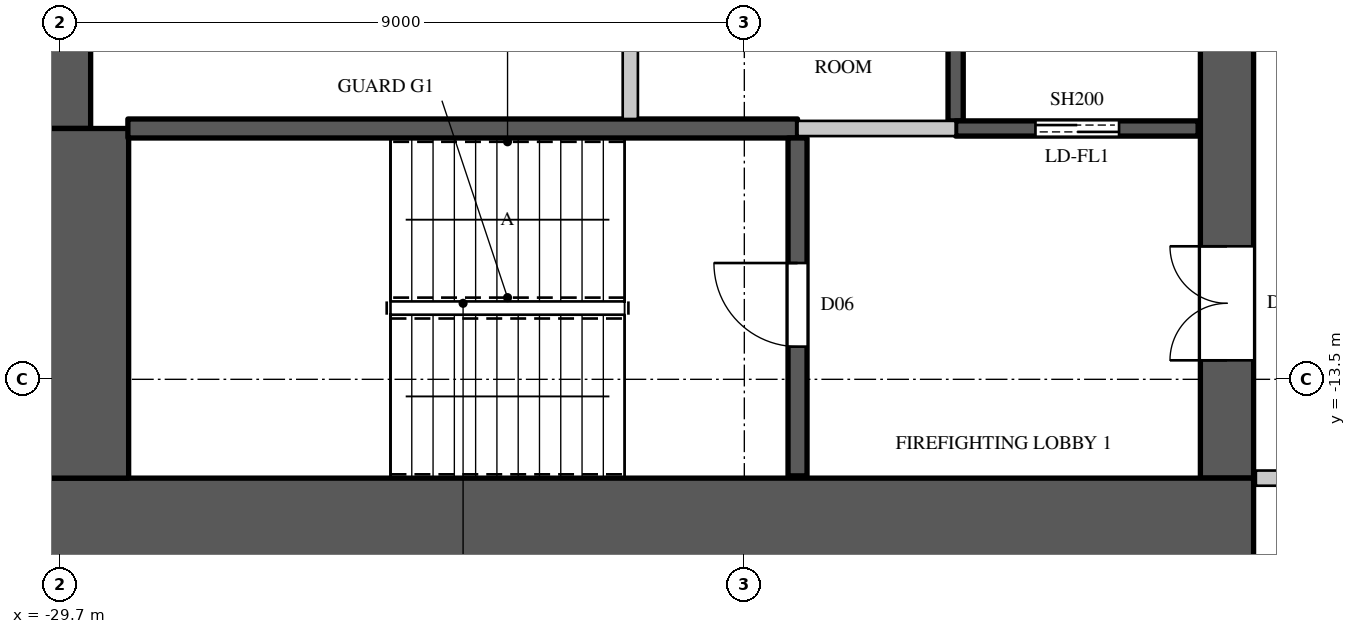
"""IFC4 building model, lengths in metres.
Left out: names, types, materials, properties, quantities, classifications, styles, units other than length and angle.
Written with IfcOpenShell. Run it as: python <this file> out.ifc"""

import sys

from ifc_helpers import new_model, si_unit, direction, frame, frame_2d, origin, place, context, subcontext, project, spatial, rectangle, extrude, element, fill, save


model = new_model("IFC4")
c1 = context("Model", 3, precision=1e-05, world=origin(), true_north=direction((0.0, 1.0)))
c2 = subcontext(c1, "Body", "Model", "MODEL_VIEW")
j1 = project(units=[si_unit("LENGTHUNIT", "METRE"), si_unit("PLANEANGLEUNIT", "RADIAN")], contexts=[c1])
p1 = place(None, origin())
s1 = spatial("IfcSite", under=j1, at=p1, CompositionType="ELEMENT")
p2 = place(p1, origin())
s2 = spatial("IfcBuilding", under=s1, at=p2, CompositionType="ELEMENT")
p3 = place(p2, frame((0.0, 0.0, 321.3)))
s3 = spatial("IfcBuildingStorey", under=s2, at=p3, CompositionType="ELEMENT", Elevation=321.3)
p4 = place(p3, frame((-30.0, -15.4, 0.0), z_axis=(0.0, 0.0, 1.0), x_axis=(1.0, 0.0, 0.0)))
e1 = element("IfcWall", 1, at=p4, inside=s3, PredefinedType="SHEAR", context=c2, shape_type="SweptSolid", body=[
    extrude(rectangle(XDim=16.0, YDim=1.2, at=frame_2d((8.0, 0.0))), origin(), (0.0, 0.0, 1.0), 4.1),
])
p5 = place(p3, frame((-14.35, -14.8, 0.0), z_axis=(0.0, 0.0, 1.0), x_axis=(0.0, 1.0, 0.0)))
e2 = element("IfcWall", 2, at=p5, inside=s3, PredefinedType="SHEAR", context=c2, shape_type="SweptSolid", body=[
    extrude(rectangle(XDim=29.6, YDim=0.7, at=frame_2d((14.8, 0.0))), origin(), (0.0, 0.0, 1.0), 4.1),
])
p6 = place(p5, frame((1.55, 0.0, 0.0)))
e3 = element("IfcOpeningElement", 3, at=p6, cuts=e2, PredefinedType="OPENING", context=c2, shape_type="SweptSolid", body=[
    extrude(rectangle(XDim=1.5, YDim=2.4, at=frame_2d((0.75, 1.2))), frame((0.0, 0.36, 0.0), z_axis=(0.0, -1.0, 0.0), x_axis=(1.0, 0.0, 0.0)), (0.0, 0.0, 1.0), 0.72),
])
p7 = place(p5, frame((26.55, 0.0, 0.0)))
e4 = element("IfcOpeningElement", 4, at=p7, cuts=e2, PredefinedType="OPENING", context=c2, shape_type="SweptSolid", body=[
    extrude(rectangle(XDim=1.5, YDim=2.4, at=frame_2d((0.75, 1.2))), frame((0.0, 0.36, 0.0), z_axis=(0.0, -1.0, 0.0), x_axis=(1.0, 0.0, 0.0)), (0.0, 0.0, 1.0), 0.72),
])
p8 = place(p5, frame((8.45, 0.0, 0.0)))
e5 = element("IfcOpeningElement", 5, at=p8, cuts=e2, PredefinedType="OPENING", context=c2, shape_type="SweptSolid", body=[
    extrude(rectangle(XDim=1.5, YDim=2.4, at=frame_2d((0.75, 1.2))), frame((0.0, 0.36, 0.0), z_axis=(0.0, -1.0, 0.0), x_axis=(1.0, 0.0, 0.0)), (0.0, 0.0, 1.0), 0.72),
])
p9 = place(p5, frame((19.65, 0.0, 0.0)))
e6 = element("IfcOpeningElement", 6, at=p9, cuts=e2, PredefinedType="OPENING", context=c2, shape_type="SweptSolid", body=[
    extrude(rectangle(XDim=1.5, YDim=2.4, at=frame_2d((0.75, 1.2))), frame((0.0, 0.36, 0.0), z_axis=(0.0, -1.0, 0.0), x_axis=(1.0, 0.0, 0.0)), (0.0, 0.0, 1.0), 0.72),
])
p10 = place(p5, frame((14.5, 0.0, 0.0)))
e7 = element("IfcOpeningElement", 7, at=p10, cuts=e2, PredefinedType="OPENING", context=c2, shape_type="SweptSolid", body=[
    extrude(rectangle(XDim=0.6, YDim=2.0, at=frame_2d((0.3, 1.0))), frame((0.0, 0.36, 0.0), z_axis=(0.0, -1.0, 0.0), x_axis=(1.0, 0.0, 0.0)), (0.0, 0.0, 1.0), 0.72),
])
p11 = place(p3, frame((-29.65, -10.2, 0.0), z_axis=(0.0, 0.0, 1.0), x_axis=(0.0, 1.0, 0.0)))
e8 = element("IfcWall", 8, at=p11, inside=s3, PredefinedType="SHEAR", context=c2, shape_type="SweptSolid", body=[
    extrude(rectangle(XDim=20.4, YDim=0.7, at=frame_2d((10.2, 0.0))), origin(), (0.0, 0.0, 1.0), 4.1),
])
p12 = place(p3, frame((-29.4, -14.8, 0.0), z_axis=(0.0, 0.0, 1.0), x_axis=(0.0, 1.0, 0.0)))
e9 = element("IfcWall", 9, at=p12, inside=s3, PredefinedType="SHEAR", context=c2, shape_type="SweptSolid", body=[
    extrude(rectangle(XDim=4.6, YDim=1.2, at=frame_2d((2.3, 0.0))), origin(), (0.0, 0.0, 1.0), 4.1),
])
p13 = place(p3, frame((-13.97, -14.8, 0.0), z_axis=(0.0, 0.0, 1.0), x_axis=(1.0, 0.0, 0.0)))
e10 = element("IfcWall", 10, at=p13, inside=s3, PredefinedType="PARTITIONING", context=c2, shape_type="SweptSolid", body=[
    extrude(rectangle(XDim=2.87, YDim=0.2, at=frame_2d((1.435, 0.0))), origin(), (0.0, 0.0, 1.0), 3.8),
])
p14 = place(p3, frame((-22.2, -10.075, 0.0), z_axis=(0.0, 0.0, 1.0), x_axis=(0.0, 1.0, 0.0)))
e11 = element("IfcWall", 11, at=p14, inside=s3, PredefinedType="PARTITIONING", context=c2, shape_type="SweptSolid", body=[
    extrude(rectangle(XDim=2.575, YDim=0.2, at=frame_2d((1.288, 0.0))), origin(), (0.0, 0.0, 1.0), 3.8),
])
p15 = place(p3, frame((-20.0, -10.2, 0.0), z_axis=(0.0, 0.0, 1.0), x_axis=(1.0, 0.0, 0.0)))
e12 = element("IfcWall", 12, at=p15, inside=s3, PredefinedType="PARTITIONING", context=c2, shape_type="SweptSolid", body=[
    extrude(rectangle(XDim=2.08, YDim=0.2, at=frame_2d((1.04, 0.0))), origin(), (0.0, 0.0, 1.0), 3.8),
])
p16 = place(p3, frame((-17.92, -10.1, 0.0), z_axis=(0.0, 0.0, 1.0), x_axis=(0.0, 1.0, 0.0)))
e13 = element("IfcWall", 13, at=p16, inside=s3, PredefinedType="SHEAR", context=c2, shape_type="SweptSolid", body=[
    extrude(rectangle(XDim=2.6, YDim=0.2, at=frame_2d((1.3, 0.0))), origin(), (0.0, 0.0, 1.0), 3.8),
])
p17 = place(p3, frame((-17.92, -10.2, 0.0), z_axis=(0.0, 0.0, 1.0), x_axis=(1.0, 0.0, 0.0)))
e14 = element("IfcWall", 14, at=p17, inside=s3, PredefinedType="SHEAR", context=c2, shape_type="SweptSolid", body=[
    extrude(rectangle(XDim=3.19, YDim=0.2, at=frame_2d((1.595, 0.0))), origin(), (0.0, 0.0, 1.0), 3.8),
])
p18 = place(p17, frame((1.05, 0.0, 0.0)))
e15 = element("IfcOpeningElement", 15, at=p18, cuts=e14, PredefinedType="OPENING", context=c2, shape_type="SweptSolid", body=[
    extrude(rectangle(XDim=1.1, YDim=2.2, at=frame_2d((0.55, 1.1))), frame((0.0, 0.11, 0.0), z_axis=(0.0, -1.0, 0.0), x_axis=(1.0, 0.0, 0.0)), (0.0, 0.0, 1.0), 0.22),
])
p19 = place(p3, frame((-28.81, -10.2, 0.0), z_axis=(0.0, 0.0, 1.0), x_axis=(1.0, 0.0, 0.0)))
e16 = element("IfcWall", 16, at=p19, inside=s3, PredefinedType="SHEAR", context=c2, shape_type="SweptSolid", body=[
    extrude(rectangle(XDim=8.81, YDim=0.25, at=frame_2d((4.405, 0.0))), origin(), (0.0, 0.0, 1.0), 3.8),
])
p20 = place(p3, frame((-20.0, -14.77, 0.0), z_axis=(0.0, 0.0, 1.0), x_axis=(0.0, 1.0, 0.0)))
e17 = element("IfcWall", 17, at=p20, inside=s3, PredefinedType="SHEAR", context=c2, shape_type="SweptSolid", body=[
    extrude(rectangle(XDim=4.445, YDim=0.25, at=frame_2d((2.223, 0.0))), origin(), (0.0, 0.0, 1.0), 3.8),
])
p21 = place(p20, frame((1.7, 0.0, 0.0)))
e18 = element("IfcOpeningElement", 18, at=p21, cuts=e17, PredefinedType="OPENING", context=c2, shape_type="SweptSolid", body=[
    extrude(rectangle(XDim=1.1, YDim=2.2, at=frame_2d((0.55, 1.1))), frame((0.0, 0.135, 0.0), z_axis=(0.0, -1.0, 0.0), x_axis=(1.0, 0.0, 0.0)), (0.0, 0.0, 1.0), 0.27),
])
p22 = place(p21, origin())
e19 = element("IfcDoor", 19, at=p22, inside=s3, OperationType="SINGLE_SWING_RIGHT", PredefinedType="DOOR", context=c2, shape_type="SweptSolid", body=[
    extrude(rectangle(XDim=1.1, YDim=2.2, at=frame_2d((0.55, 1.1))), frame((0.0, 0.025, 0.0), z_axis=(0.0, -1.0, 0.0), x_axis=(1.0, 0.0, 0.0)), (0.0, 0.0, 1.0), 0.05),
])
fill(e18, e19)
p23 = place(p18, origin())
e20 = element("IfcDoor", 20, at=p23, inside=s3, OperationType="DOUBLE_DOOR_SLIDING", PredefinedType="DOOR", context=c2, shape_type="SweptSolid", body=[
    extrude(rectangle(XDim=1.1, YDim=2.2, at=frame_2d((0.55, 1.1))), frame((0.0, 0.025, 0.0), z_axis=(0.0, -1.0, 0.0), x_axis=(1.0, 0.0, 0.0)), (0.0, 0.0, 1.0), 0.05),
])
fill(e15, e20)
p24 = place(p6, origin())
e21 = element("IfcDoor", 21, at=p24, inside=s3, OperationType="DOUBLE_DOOR_SINGLE_SWING", PredefinedType="DOOR", context=c2, shape_type="SweptSolid", body=[
    extrude(rectangle(XDim=1.5, YDim=2.4, at=frame_2d((0.75, 1.2))), frame((0.0, 0.345, 0.0), z_axis=(0.0, -1.0, 0.0), x_axis=(1.0, 0.0, 0.0)), (0.0, 0.0, 1.0), 0.05),
])
fill(e3, e21)
save(model, sys.argv[1])
